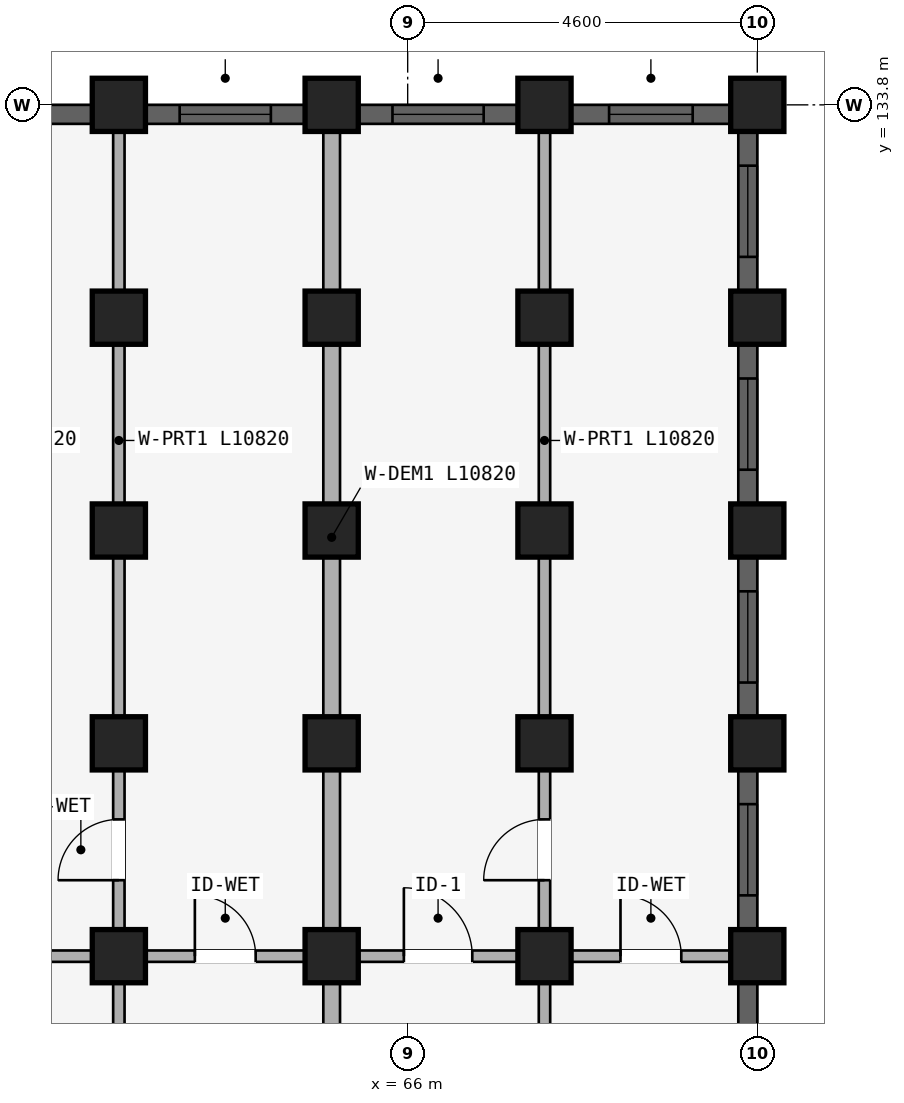
"""IFC4 building model, lengths in metres.
Left out: names, types, materials, properties, quantities, classifications, styles, units other than length and angle.
Written with IfcOpenShell. Run it as: python <this file> out.ifc"""

import sys

from ifc_helpers import new_model, si_unit, direction, frame, frame_2d, origin, origin_2d, place, context, subcontext, project, spatial, rectangle, extrude, element, fill, save


model = new_model("IFC4")
c1 = context("Model", 3, precision=1e-05, world=origin(), true_north=direction((0.0, 1.0)))
c2 = subcontext(c1, "Body", "Model", "MODEL_VIEW")
j1 = project(units=[si_unit("LENGTHUNIT", "METRE"), si_unit("PLANEANGLEUNIT", "RADIAN")], contexts=[c1])
p1 = place(None, origin())
s1 = spatial("IfcSite", under=j1, at=p1, CompositionType="ELEMENT")
p2 = place(p1, origin())
s2 = spatial("IfcBuilding", under=s1, at=p2, CompositionType="ELEMENT")
p3 = place(p2, frame((0.0, 0.0, 27.6)))
s3 = spatial("IfcBuildingStorey", under=s2, at=p3, CompositionType="ELEMENT", Elevation=27.6)
for number, where, z_axis, x_axis in (
    (1, (62.2, 122.6, 0.0), (0.0, 0.0, 1.0), (1.0, 0.0, 0.0)),
    (2, (62.2, 125.4, 0.0), (0.0, 0.0, 1.0), (1.0, 0.0, 0.0)),
    (3, (62.2, 128.2, 0.0), (0.0, 0.0, 1.0), (1.0, 0.0, 0.0)),
    (4, (62.2, 131.0, 0.0), (0.0, 0.0, 1.0), (1.0, 0.0, 0.0)),
    (5, (62.2, 133.8, 0.0), (0.0, 0.0, 1.0), (1.0, 0.0, 0.0)),
    (6, (65.0, 122.6, 0.0), (0.0, 0.0, 1.0), (1.0, 0.0, 0.0)),
    (7, (65.0, 125.4, 0.0), (0.0, 0.0, 1.0), (1.0, 0.0, 0.0)),
    (8, (65.0, 128.2, 0.0), (0.0, 0.0, 1.0), (1.0, 0.0, 0.0)),
    (9, (65.0, 131.0, 0.0), (0.0, 0.0, 1.0), (1.0, 0.0, 0.0)),
    (10, (65.0, 133.8, 0.0), (0.0, 0.0, 1.0), (1.0, 0.0, 0.0)),
    (11, (67.8, 122.6, 0.0), (0.0, 0.0, 1.0), (1.0, 0.0, 0.0)),
    (12, (67.8, 125.4, 0.0), (0.0, 0.0, 1.0), (1.0, 0.0, 0.0)),
    (13, (67.8, 128.2, 0.0), (0.0, 0.0, 1.0), (1.0, 0.0, 0.0)),
    (14, (67.8, 131.0, 0.0), (0.0, 0.0, 1.0), (1.0, 0.0, 0.0)),
    (15, (67.8, 133.8, 0.0), (0.0, 0.0, 1.0), (1.0, 0.0, 0.0)),
    (16, (70.6, 122.6, 0.0), (0.0, 0.0, 1.0), (1.0, 0.0, 0.0)),
    (17, (70.6, 125.4, 0.0), (0.0, 0.0, 1.0), (1.0, 0.0, 0.0)),
    (18, (70.6, 128.2, 0.0), (0.0, 0.0, 1.0), (1.0, 0.0, 0.0)),
    (19, (70.6, 131.0, 0.0), (0.0, 0.0, 1.0), (1.0, 0.0, 0.0)),
    (20, (70.6, 133.8, 0.0), (0.0, 0.0, 1.0), (1.0, 0.0, 0.0)),
):
    element("IfcColumn", number, at=place(p3, frame(where, z_axis=z_axis, x_axis=x_axis)), inside=s3, PredefinedType="COLUMN", context=c2, shape_type="SweptSolid", body=[
        extrude(rectangle(XDim=0.7, YDim=0.7, at=origin_2d()), origin(), (0.0, 0.0, 1.0), 2.93),
    ])
p4 = place(p3, frame((59.48, 122.6, 0.0), z_axis=(0.0, 0.0, 1.0), x_axis=(1.0, 0.0, 0.0)))
e21 = element("IfcWall", 21, at=p4, inside=s3, PredefinedType="PLUMBINGWALL", context=c2, shape_type="SweptSolid", body=[
    extrude(rectangle(XDim=2.64, YDim=0.15, at=frame_2d((1.32, 0.0))), origin(), (0.0, 0.0, 1.0), 2.372),
])
p5 = place(p4, frame((0.87, 0.0, 0.0)))
e22 = element("IfcOpeningElement", 22, at=p5, cuts=e21, PredefinedType="OPENING", context=c2, shape_type="SweptSolid", body=[
    extrude(rectangle(XDim=0.9, YDim=2.1, at=frame_2d((0.45, 1.05))), frame((0.0, 0.085, 0.0), z_axis=(0.0, -1.0, 0.0), x_axis=(1.0, 0.0, 0.0)), (0.0, 0.0, 1.0), 0.17),
])
p6 = place(p3, frame((62.28, 122.6, 0.0), z_axis=(0.0, 0.0, 1.0), x_axis=(1.0, 0.0, 0.0)))
e23 = element("IfcWall", 23, at=p6, inside=s3, PredefinedType="PLUMBINGWALL", context=c2, shape_type="SweptSolid", body=[
    extrude(rectangle(XDim=2.64, YDim=0.15, at=frame_2d((1.32, 0.0))), origin(), (0.0, 0.0, 1.0), 2.372),
])
p7 = place(p6, frame((0.92, 0.0, 0.0)))
e24 = element("IfcOpeningElement", 24, at=p7, cuts=e23, PredefinedType="OPENING", context=c2, shape_type="SweptSolid", body=[
    extrude(rectangle(XDim=0.8, YDim=2.1, at=frame_2d((0.4, 1.05))), frame((0.0, 0.085, 0.0), z_axis=(0.0, -1.0, 0.0), x_axis=(1.0, 0.0, 0.0)), (0.0, 0.0, 1.0), 0.17),
])
p8 = place(p3, frame((65.08, 122.6, 0.0), z_axis=(0.0, 0.0, 1.0), x_axis=(1.0, 0.0, 0.0)))
e25 = element("IfcWall", 25, at=p8, inside=s3, PredefinedType="PLUMBINGWALL", context=c2, shape_type="SweptSolid", body=[
    extrude(rectangle(XDim=2.64, YDim=0.15, at=frame_2d((1.32, 0.0))), origin(), (0.0, 0.0, 1.0), 2.372),
])
p9 = place(p8, frame((0.87, 0.0, 0.0)))
e26 = element("IfcOpeningElement", 26, at=p9, cuts=e25, PredefinedType="OPENING", context=c2, shape_type="SweptSolid", body=[
    extrude(rectangle(XDim=0.9, YDim=2.1, at=frame_2d((0.45, 1.05))), frame((0.0, 0.085, 0.0), z_axis=(0.0, -1.0, 0.0), x_axis=(1.0, 0.0, 0.0)), (0.0, 0.0, 1.0), 0.17),
])
p10 = place(p3, frame((67.88, 122.6, 0.0), z_axis=(0.0, 0.0, 1.0), x_axis=(1.0, 0.0, 0.0)))
e27 = element("IfcWall", 27, at=p10, inside=s3, PredefinedType="PLUMBINGWALL", context=c2, shape_type="SweptSolid", body=[
    extrude(rectangle(XDim=2.64, YDim=0.15, at=frame_2d((1.32, 0.0))), origin(), (0.0, 0.0, 1.0), 2.372),
])
p11 = place(p10, frame((0.92, 0.0, 0.0)))
e28 = element("IfcOpeningElement", 28, at=p11, cuts=e27, PredefinedType="OPENING", context=c2, shape_type="SweptSolid", body=[
    extrude(rectangle(XDim=0.8, YDim=2.1, at=frame_2d((0.4, 1.05))), frame((0.0, 0.085, 0.0), z_axis=(0.0, -1.0, 0.0), x_axis=(1.0, 0.0, 0.0)), (0.0, 0.0, 1.0), 0.17),
])
p12 = place(p3, frame((62.2, 116.05, 0.0), z_axis=(0.0, 0.0, 1.0), x_axis=(0.0, 1.0, 0.0)))
e29 = element("IfcWall", 29, at=p12, inside=s3, PredefinedType="PARTITIONING", context=c2, shape_type="SweptSolid", body=[
    extrude(rectangle(XDim=6.53, YDim=0.15, at=frame_2d((3.265, 0.0))), origin(), (0.0, 0.0, 1.0), 2.372),
])
p13 = place(p12, frame((2.815, 0.0, 0.0)))
e30 = element("IfcOpeningElement", 30, at=p13, cuts=e29, PredefinedType="OPENING", context=c2, shape_type="SweptSolid", body=[
    extrude(rectangle(XDim=0.9, YDim=2.1, at=frame_2d((0.45, 1.05))), frame((0.0, 0.085, 0.0), z_axis=(0.0, -1.0, 0.0), x_axis=(1.0, 0.0, 0.0)), (0.0, 0.0, 1.0), 0.17),
])
p14 = place(p3, frame((62.2, 122.7, 0.0), z_axis=(0.0, 0.0, 1.0), x_axis=(0.0, 1.0, 0.0)))
e31 = element("IfcWall", 31, at=p14, inside=s3, PredefinedType="PARTITIONING", context=c2, shape_type="SweptSolid", body=[
    extrude(rectangle(XDim=10.82, YDim=0.15, at=frame_2d((5.41, 0.0))), origin(), (0.0, 0.0, 1.0), 2.372),
])
p15 = place(p14, frame((0.899, 0.0, 0.0)))
e32 = element("IfcOpeningElement", 32, at=p15, cuts=e31, PredefinedType="OPENING", context=c2, shape_type="SweptSolid", body=[
    extrude(rectangle(XDim=0.8, YDim=2.1, at=frame_2d((0.4, 1.05))), frame((0.0, 0.085, 0.0), z_axis=(0.0, -1.0, 0.0), x_axis=(1.0, 0.0, 0.0)), (0.0, 0.0, 1.0), 0.17),
])
p16 = place(p3, frame((65.0, 116.05, 0.0), z_axis=(0.0, 0.0, 1.0), x_axis=(0.0, 1.0, 0.0)))
e33 = element("IfcWall", 33, at=p16, inside=s3, PredefinedType="STANDARD", context=c2, shape_type="SweptSolid", body=[
    extrude(rectangle(XDim=6.53, YDim=0.22, at=frame_2d((3.265, 0.0))), origin(), (0.0, 0.0, 1.0), 2.372),
])
p17 = place(p3, frame((65.0, 122.7, 0.0), z_axis=(0.0, 0.0, 1.0), x_axis=(0.0, 1.0, 0.0)))
e34 = element("IfcWall", 34, at=p17, inside=s3, PredefinedType="STANDARD", context=c2, shape_type="SweptSolid", body=[
    extrude(rectangle(XDim=10.82, YDim=0.22, at=frame_2d((5.41, 0.0))), origin(), (0.0, 0.0, 1.0), 2.372),
])
p18 = place(p3, frame((67.8, 116.05, 0.0), z_axis=(0.0, 0.0, 1.0), x_axis=(0.0, 1.0, 0.0)))
e35 = element("IfcWall", 35, at=p18, inside=s3, PredefinedType="PARTITIONING", context=c2, shape_type="SweptSolid", body=[
    extrude(rectangle(XDim=6.53, YDim=0.15, at=frame_2d((3.265, 0.0))), origin(), (0.0, 0.0, 1.0), 2.372),
])
p19 = place(p18, frame((2.815, 0.0, 0.0)))
e36 = element("IfcOpeningElement", 36, at=p19, cuts=e35, PredefinedType="OPENING", context=c2, shape_type="SweptSolid", body=[
    extrude(rectangle(XDim=0.9, YDim=2.1, at=frame_2d((0.45, 1.05))), frame((0.0, 0.085, 0.0), z_axis=(0.0, -1.0, 0.0), x_axis=(1.0, 0.0, 0.0)), (0.0, 0.0, 1.0), 0.17),
])
p20 = place(p3, frame((67.8, 122.7, 0.0), z_axis=(0.0, 0.0, 1.0), x_axis=(0.0, 1.0, 0.0)))
e37 = element("IfcWall", 37, at=p20, inside=s3, PredefinedType="PARTITIONING", context=c2, shape_type="SweptSolid", body=[
    extrude(rectangle(XDim=10.82, YDim=0.15, at=frame_2d((5.41, 0.0))), origin(), (0.0, 0.0, 1.0), 2.372),
])
p21 = place(p20, frame((0.899, 0.0, 0.0)))
e38 = element("IfcOpeningElement", 38, at=p21, cuts=e37, PredefinedType="OPENING", context=c2, shape_type="SweptSolid", body=[
    extrude(rectangle(XDim=0.8, YDim=2.1, at=frame_2d((0.4, 1.05))), frame((0.0, 0.085, 0.0), z_axis=(0.0, -1.0, 0.0), x_axis=(1.0, 0.0, 0.0)), (0.0, 0.0, 1.0), 0.17),
])
p22 = place(p3, frame((59.753, 133.675, 0.0), z_axis=(0.0, 0.0, 1.0), x_axis=(1.0, 0.0, 0.0)))
e39 = element("IfcWall", 39, at=p22, inside=s3, PredefinedType="STANDARD", context=c2, shape_type="SweptSolid", body=[
    extrude(rectangle(XDim=2.093, YDim=0.25, at=frame_2d((1.046, 0.0))), origin(), (0.0, 0.0, 1.0), 2.472),
])
p23 = place(p22, frame((0.572, 0.0, 0.88)))
e40 = element("IfcOpeningElement", 40, at=p23, cuts=e39, PredefinedType="OPENING", context=c2, shape_type="SweptSolid", body=[
    extrude(rectangle(XDim=0.95, YDim=1.35, at=frame_2d((0.475, 0.675))), frame((0.0, 0.135, 0.0), z_axis=(0.0, -1.0, 0.0), x_axis=(1.0, 0.0, 0.0)), (0.0, 0.0, 1.0), 0.27),
])
p24 = place(p3, frame((62.553, 133.675, 0.0), z_axis=(0.0, 0.0, 1.0), x_axis=(1.0, 0.0, 0.0)))
e41 = element("IfcWall", 41, at=p24, inside=s3, PredefinedType="STANDARD", context=c2, shape_type="SweptSolid", body=[
    extrude(rectangle(XDim=2.093, YDim=0.25, at=frame_2d((1.046, 0.0))), origin(), (0.0, 0.0, 1.0), 2.472),
])
p25 = place(p24, frame((0.447, 0.0, 0.772)))
e42 = element("IfcOpeningElement", 42, at=p25, cuts=e41, PredefinedType="OPENING", context=c2, shape_type="SweptSolid", body=[
    extrude(rectangle(XDim=1.2, YDim=1.5, at=frame_2d((0.6, 0.75))), frame((0.0, 0.135, 0.0), z_axis=(0.0, -1.0, 0.0), x_axis=(1.0, 0.0, 0.0)), (0.0, 0.0, 1.0), 0.27),
])
p26 = place(p3, frame((65.354, 133.675, 0.0), z_axis=(0.0, 0.0, 1.0), x_axis=(1.0, 0.0, 0.0)))
e43 = element("IfcWall", 43, at=p26, inside=s3, PredefinedType="STANDARD", context=c2, shape_type="SweptSolid", body=[
    extrude(rectangle(XDim=2.093, YDim=0.25, at=frame_2d((1.046, 0.0))), origin(), (0.0, 0.0, 1.0), 2.472),
])
p27 = place(p26, frame((0.447, 0.0, 0.772)))
e44 = element("IfcOpeningElement", 44, at=p27, cuts=e43, PredefinedType="OPENING", context=c2, shape_type="SweptSolid", body=[
    extrude(rectangle(XDim=1.2, YDim=1.5, at=frame_2d((0.6, 0.75))), frame((0.0, 0.135, 0.0), z_axis=(0.0, -1.0, 0.0), x_axis=(1.0, 0.0, 0.0)), (0.0, 0.0, 1.0), 0.27),
])
p28 = place(p3, frame((68.154, 133.675, 0.0), z_axis=(0.0, 0.0, 1.0), x_axis=(1.0, 0.0, 0.0)))
e45 = element("IfcWall", 45, at=p28, inside=s3, PredefinedType="STANDARD", context=c2, shape_type="SweptSolid", body=[
    extrude(rectangle(XDim=2.093, YDim=0.25, at=frame_2d((1.046, 0.0))), origin(), (0.0, 0.0, 1.0), 2.472),
])
p29 = place(p28, frame((0.497, 0.0, 0.822)))
e46 = element("IfcOpeningElement", 46, at=p29, cuts=e45, PredefinedType="OPENING", context=c2, shape_type="SweptSolid", body=[
    extrude(rectangle(XDim=1.1, YDim=1.45, at=frame_2d((0.55, 0.725))), frame((0.0, 0.135, 0.0), z_axis=(0.0, -1.0, 0.0), x_axis=(1.0, 0.0, 0.0)), (0.0, 0.0, 1.0), 0.27),
])
p30 = place(p3, frame((70.475, 116.329, 0.0), z_axis=(0.0, 0.0, 1.0), x_axis=(0.0, 1.0, 0.0)))
e47 = element("IfcWall", 47, at=p30, inside=s3, PredefinedType="STANDARD", context=c2, shape_type="SweptSolid", body=[
    extrude(rectangle(XDim=5.918, YDim=0.25, at=frame_2d((2.959, 0.0))), origin(), (0.0, 0.0, 1.0), 2.372),
])
p31 = place(p30, frame((2.221, 0.0, 0.522)))
e48 = element("IfcOpeningElement", 48, at=p31, cuts=e47, PredefinedType="OPENING", context=c2, shape_type="SweptSolid", body=[
    extrude(rectangle(XDim=1.5, YDim=1.65, at=frame_2d((0.75, 0.825))), frame((0.0, 0.135, 0.0), z_axis=(0.0, -1.0, 0.0), x_axis=(1.0, 0.0, 0.0)), (0.0, 0.0, 1.0), 0.27),
])
p32 = place(p3, frame((70.475, 122.954, 0.0), z_axis=(0.0, 0.0, 1.0), x_axis=(0.0, 1.0, 0.0)))
e49 = element("IfcWall", 49, at=p32, inside=s3, PredefinedType="STANDARD", context=c2, shape_type="SweptSolid", body=[
    extrude(rectangle(XDim=2.093, YDim=0.25, at=frame_2d((1.046, 0.0))), origin(), (0.0, 0.0, 1.0), 2.372),
])
p33 = place(p32, frame((0.447, 0.0, 0.672)))
e50 = element("IfcOpeningElement", 50, at=p33, cuts=e49, PredefinedType="OPENING", context=c2, shape_type="SweptSolid", body=[
    extrude(rectangle(XDim=1.2, YDim=1.5, at=frame_2d((0.6, 0.75))), frame((0.0, 0.135, 0.0), z_axis=(0.0, -1.0, 0.0), x_axis=(1.0, 0.0, 0.0)), (0.0, 0.0, 1.0), 0.27),
])
p34 = place(p3, frame((70.475, 125.753, 0.0), z_axis=(0.0, 0.0, 1.0), x_axis=(0.0, 1.0, 0.0)))
e51 = element("IfcWall", 51, at=p34, inside=s3, PredefinedType="STANDARD", context=c2, shape_type="SweptSolid", body=[
    extrude(rectangle(XDim=2.093, YDim=0.25, at=frame_2d((1.046, 0.0))), origin(), (0.0, 0.0, 1.0), 2.372),
])
p35 = place(p34, frame((0.447, 0.0, 0.672)))
e52 = element("IfcOpeningElement", 52, at=p35, cuts=e51, PredefinedType="OPENING", context=c2, shape_type="SweptSolid", body=[
    extrude(rectangle(XDim=1.2, YDim=1.5, at=frame_2d((0.6, 0.75))), frame((0.0, 0.135, 0.0), z_axis=(0.0, -1.0, 0.0), x_axis=(1.0, 0.0, 0.0)), (0.0, 0.0, 1.0), 0.27),
])
p36 = place(p3, frame((70.475, 128.553, 0.0), z_axis=(0.0, 0.0, 1.0), x_axis=(0.0, 1.0, 0.0)))
e53 = element("IfcWall", 53, at=p36, inside=s3, PredefinedType="STANDARD", context=c2, shape_type="SweptSolid", body=[
    extrude(rectangle(XDim=2.093, YDim=0.25, at=frame_2d((1.046, 0.0))), origin(), (0.0, 0.0, 1.0), 2.372),
])
p37 = place(p36, frame((0.447, 0.0, 0.672)))
e54 = element("IfcOpeningElement", 54, at=p37, cuts=e53, PredefinedType="OPENING", context=c2, shape_type="SweptSolid", body=[
    extrude(rectangle(XDim=1.2, YDim=1.5, at=frame_2d((0.6, 0.75))), frame((0.0, 0.135, 0.0), z_axis=(0.0, -1.0, 0.0), x_axis=(1.0, 0.0, 0.0)), (0.0, 0.0, 1.0), 0.27),
])
p38 = place(p3, frame((70.475, 131.354, 0.0), z_axis=(0.0, 0.0, 1.0), x_axis=(0.0, 1.0, 0.0)))
e55 = element("IfcWall", 55, at=p38, inside=s3, PredefinedType="STANDARD", context=c2, shape_type="SweptSolid", body=[
    extrude(rectangle(XDim=2.093, YDim=0.25, at=frame_2d((1.046, 0.0))), origin(), (0.0, 0.0, 1.0), 2.372),
])
p39 = place(p38, frame((0.447, 0.0, 0.672)))
e56 = element("IfcOpeningElement", 56, at=p39, cuts=e55, PredefinedType="OPENING", context=c2, shape_type="SweptSolid", body=[
    extrude(rectangle(XDim=1.2, YDim=1.5, at=frame_2d((0.6, 0.75))), frame((0.0, 0.135, 0.0), z_axis=(0.0, -1.0, 0.0), x_axis=(1.0, 0.0, 0.0)), (0.0, 0.0, 1.0), 0.27),
])
p40 = place(p25, origin())
e57 = element("IfcWindow", 57, at=p40, inside=s3, PartitioningType="SINGLE_PANEL", PredefinedType="WINDOW", context=c2, shape_type="SweptSolid", body=[
    extrude(rectangle(XDim=1.2, YDim=1.5, at=frame_2d((0.6, 0.75))), frame((0.0, 0.03, 0.0), z_axis=(0.0, -1.0, 0.0), x_axis=(1.0, 0.0, 0.0)), (0.0, 0.0, 1.0), 0.06),
])
fill(e42, e57)
p41 = place(p27, origin())
e58 = element("IfcWindow", 58, at=p41, inside=s3, PartitioningType="SINGLE_PANEL", PredefinedType="WINDOW", context=c2, shape_type="SweptSolid", body=[
    extrude(rectangle(XDim=1.2, YDim=1.5, at=frame_2d((0.6, 0.75))), frame((0.0, 0.03, 0.0), z_axis=(0.0, -1.0, 0.0), x_axis=(1.0, 0.0, 0.0)), (0.0, 0.0, 1.0), 0.06),
])
fill(e44, e58)
p42 = place(p29, origin())
e59 = element("IfcWindow", 59, at=p42, inside=s3, PartitioningType="SINGLE_PANEL", PredefinedType="WINDOW", context=c2, shape_type="SweptSolid", body=[
    extrude(rectangle(XDim=1.1, YDim=1.45, at=frame_2d((0.55, 0.725))), frame((0.0, 0.03, 0.0), z_axis=(0.0, -1.0, 0.0), x_axis=(1.0, 0.0, 0.0)), (0.0, 0.0, 1.0), 0.06),
])
fill(e46, e59)
p43 = place(p33, origin())
e60 = element("IfcWindow", 60, at=p43, inside=s3, PartitioningType="SINGLE_PANEL", PredefinedType="WINDOW", context=c2, shape_type="SweptSolid", body=[
    extrude(rectangle(XDim=1.2, YDim=1.5, at=frame_2d((0.6, 0.75))), frame((0.0, 0.03, 0.0), z_axis=(0.0, -1.0, 0.0), x_axis=(1.0, 0.0, 0.0)), (0.0, 0.0, 1.0), 0.06),
])
fill(e50, e60)
p44 = place(p35, origin())
e61 = element("IfcWindow", 61, at=p44, inside=s3, PartitioningType="SINGLE_PANEL", PredefinedType="WINDOW", context=c2, shape_type="SweptSolid", body=[
    extrude(rectangle(XDim=1.2, YDim=1.5, at=frame_2d((0.6, 0.75))), frame((0.0, 0.03, 0.0), z_axis=(0.0, -1.0, 0.0), x_axis=(1.0, 0.0, 0.0)), (0.0, 0.0, 1.0), 0.06),
])
fill(e52, e61)
p45 = place(p37, origin())
e62 = element("IfcWindow", 62, at=p45, inside=s3, PartitioningType="SINGLE_PANEL", PredefinedType="WINDOW", context=c2, shape_type="SweptSolid", body=[
    extrude(rectangle(XDim=1.2, YDim=1.5, at=frame_2d((0.6, 0.75))), frame((0.0, 0.03, 0.0), z_axis=(0.0, -1.0, 0.0), x_axis=(1.0, 0.0, 0.0)), (0.0, 0.0, 1.0), 0.06),
])
fill(e54, e62)
p46 = place(p39, origin())
e63 = element("IfcWindow", 63, at=p46, inside=s3, PartitioningType="SINGLE_PANEL", PredefinedType="WINDOW", context=c2, shape_type="SweptSolid", body=[
    extrude(rectangle(XDim=1.2, YDim=1.5, at=frame_2d((0.6, 0.75))), frame((0.0, 0.03, 0.0), z_axis=(0.0, -1.0, 0.0), x_axis=(1.0, 0.0, 0.0)), (0.0, 0.0, 1.0), 0.06),
])
fill(e56, e63)
p47 = place(p7, frame((0.8, 0.0, 0.0), z_axis=(0.0, 0.0, 1.0), x_axis=(-1.0, 0.0, 0.0)))
e64 = element("IfcDoor", 64, at=p47, inside=s3, OperationType="SINGLE_SWING_RIGHT", PredefinedType="DOOR", context=c2, shape_type="SweptSolid", body=[
    extrude(rectangle(XDim=0.8, YDim=2.1, at=frame_2d((0.4, 1.05))), frame((0.0, 0.025, 0.0), z_axis=(0.0, -1.0, 0.0), x_axis=(1.0, 0.0, 0.0)), (0.0, 0.0, 1.0), 0.05),
])
fill(e24, e64)
p48 = place(p9, frame((0.9, 0.0, 0.0), z_axis=(0.0, 0.0, 1.0), x_axis=(-1.0, 0.0, 0.0)))
e65 = element("IfcDoor", 65, at=p48, inside=s3, OperationType="SINGLE_SWING_RIGHT", PredefinedType="DOOR", context=c2, shape_type="SweptSolid", body=[
    extrude(rectangle(XDim=0.9, YDim=2.1, at=frame_2d((0.45, 1.05))), frame((0.0, 0.025, 0.0), z_axis=(0.0, -1.0, 0.0), x_axis=(1.0, 0.0, 0.0)), (0.0, 0.0, 1.0), 0.05),
])
fill(e26, e65)
p49 = place(p11, frame((0.8, 0.0, 0.0), z_axis=(0.0, 0.0, 1.0), x_axis=(-1.0, 0.0, 0.0)))
e66 = element("IfcDoor", 66, at=p49, inside=s3, OperationType="SINGLE_SWING_RIGHT", PredefinedType="DOOR", context=c2, shape_type="SweptSolid", body=[
    extrude(rectangle(XDim=0.8, YDim=2.1, at=frame_2d((0.4, 1.05))), frame((0.0, 0.025, 0.0), z_axis=(0.0, -1.0, 0.0), x_axis=(1.0, 0.0, 0.0)), (0.0, 0.0, 1.0), 0.05),
])
fill(e28, e66)
p50 = place(p15, frame((0.8, 0.0, 0.0), z_axis=(0.0, 0.0, 1.0), x_axis=(-1.0, 0.0, 0.0)))
e67 = element("IfcDoor", 67, at=p50, inside=s3, OperationType="SINGLE_SWING_RIGHT", PredefinedType="DOOR", context=c2, shape_type="SweptSolid", body=[
    extrude(rectangle(XDim=0.8, YDim=2.1, at=frame_2d((0.4, 1.05))), frame((0.0, 0.025, 0.0), z_axis=(0.0, -1.0, 0.0), x_axis=(1.0, 0.0, 0.0)), (0.0, 0.0, 1.0), 0.05),
])
fill(e32, e67)
p51 = place(p21, origin())
e68 = element("IfcDoor", 68, at=p51, inside=s3, OperationType="SINGLE_SWING_LEFT", PredefinedType="DOOR", context=c2, shape_type="SweptSolid", body=[
    extrude(rectangle(XDim=0.8, YDim=2.1, at=frame_2d((0.4, 1.05))), frame((0.0, 0.025, 0.0), z_axis=(0.0, -1.0, 0.0), x_axis=(1.0, 0.0, 0.0)), (0.0, 0.0, 1.0), 0.05),
])
fill(e38, e68)
save(model, sys.argv[1])
